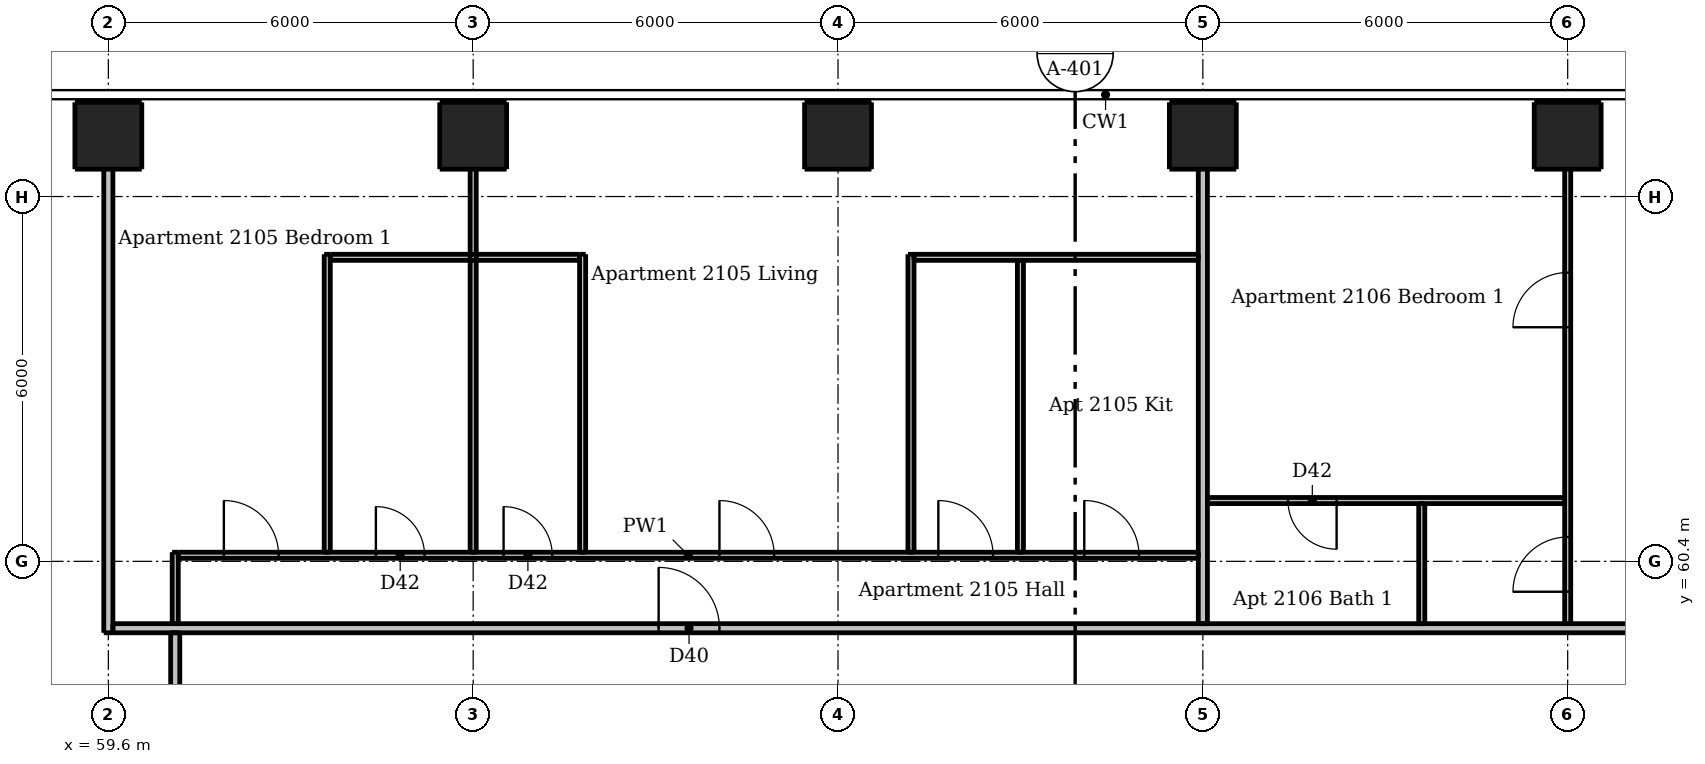
"""IFC4 building model, lengths in metres.
Left out: names, types, materials, properties, quantities, classifications, styles, units other than length and angle.
Written with IfcOpenShell. Run it as: python <this file> out.ifc"""

import sys

from ifc_helpers import new_model, si_unit, direction, frame, frame_2d, origin, origin_2d, place, context, subcontext, project, spatial, rectangle, extrude, element, fill, save


model = new_model("IFC4")
c1 = context("Model", 3, precision=1e-05, world=origin(), true_north=direction((0.0, 1.0)))
c2 = subcontext(c1, "Body", "Model", "MODEL_VIEW")
j1 = project(units=[si_unit("LENGTHUNIT", "METRE"), si_unit("PLANEANGLEUNIT", "RADIAN")], contexts=[c1])
p1 = place(None, origin())
s1 = spatial("IfcSite", under=j1, at=p1, CompositionType="ELEMENT")
p2 = place(p1, origin())
s2 = spatial("IfcBuilding", under=s1, at=p2, CompositionType="ELEMENT")
p3 = place(p2, frame((0.0, 0.0, 82.0)))
s3 = spatial("IfcBuildingStorey", under=s2, at=p3, CompositionType="ELEMENT", Elevation=82.0)
for number, where, z_axis, x_axis in (
    (1, (59.6, 67.4, 0.0), (0.0, 0.0, 1.0), (1.0, 0.0, 0.0)),
    (2, (65.6, 67.4, 0.0), (0.0, 0.0, 1.0), (1.0, 0.0, 0.0)),
    (3, (71.6, 67.4, 0.0), (0.0, 0.0, 1.0), (1.0, 0.0, 0.0)),
    (4, (77.6, 67.4, 0.0), (0.0, 0.0, 1.0), (1.0, 0.0, 0.0)),
    (5, (83.6, 67.4, 0.0), (0.0, 0.0, 1.0), (1.0, 0.0, 0.0)),
):
    element("IfcColumn", number, at=place(p3, frame(where, z_axis=z_axis, x_axis=x_axis)), inside=s3, PredefinedType="COLUMN", context=c2, shape_type="SweptSolid", body=[
        extrude(rectangle(XDim=1.1, YDim=1.1, at=origin_2d()), origin(), (0.0, 0.0, 1.0), 3.05),
    ])
p4 = place(p3, frame((60.7, 59.375, 0.0), z_axis=(0.0, 0.0, 1.0), x_axis=(0.0, 1.0, 0.0)))
e6 = element("IfcWall", 6, at=p4, inside=s3, PredefinedType="PARTITIONING", context=c2, shape_type="SweptSolid", body=[
    extrude(rectangle(XDim=1.175, YDim=0.1, at=frame_2d((0.587, 0.0))), origin(), (0.0, 0.0, 1.0), 3.05),
])
p5 = place(p3, frame((63.2, 60.55, 0.0), z_axis=(0.0, 0.0, 1.0), x_axis=(0.0, 1.0, 0.0)))
e7 = element("IfcWall", 7, at=p5, inside=s3, PredefinedType="PARTITIONING", context=c2, shape_type="SweptSolid", body=[
    extrude(rectangle(XDim=4.9, YDim=0.1, at=frame_2d((2.45, 0.0))), origin(), (0.0, 0.0, 1.0), 3.05),
])
p6 = place(p3, frame((65.6, 60.55, 0.0), z_axis=(0.0, 0.0, 1.0), x_axis=(0.0, 1.0, 0.0)))
e8 = element("IfcWall", 8, at=p6, inside=s3, PredefinedType="PARTITIONING", context=c2, shape_type="SweptSolid", body=[
    extrude(rectangle(XDim=7.45, YDim=0.1, at=frame_2d((3.725, 0.0))), origin(), (0.0, 0.0, 1.0), 2.516),
])
for number, where, z_axis, x_axis in (
    (9, (67.4, 60.55, 0.0), (0.0, 0.0, 1.0), (0.0, 1.0, 0.0)),
    (10, (72.8, 60.55, 0.0), (0.0, 0.0, 1.0), (0.0, 1.0, 0.0)),
):
    element("IfcWall", number, at=place(p3, frame(where, z_axis=z_axis, x_axis=x_axis)), inside=s3, PredefinedType="PARTITIONING", context=c2, shape_type="SweptSolid", body=[
        extrude(rectangle(XDim=4.9, YDim=0.1, at=frame_2d((2.45, 0.0))), origin(), (0.0, 0.0, 1.0), 3.05),
    ])
p7 = place(p3, frame((74.6, 60.55, 0.0), z_axis=(0.0, 0.0, 1.0), x_axis=(0.0, 1.0, 0.0)))
e11 = element("IfcWall", 11, at=p7, inside=s3, PredefinedType="PARTITIONING", context=c2, shape_type="SweptSolid", body=[
    extrude(rectangle(XDim=4.8, YDim=0.1, at=frame_2d((2.4, 0.0))), origin(), (0.0, 0.0, 1.0), 3.05),
])
p8 = place(p3, frame((81.2, 59.375, 0.0), z_axis=(0.0, 0.0, 1.0), x_axis=(0.0, 1.0, 0.0)))
e12 = element("IfcWall", 12, at=p8, inside=s3, PredefinedType="PARTITIONING", context=c2, shape_type="SweptSolid", body=[
    extrude(rectangle(XDim=1.975, YDim=0.1, at=frame_2d((0.988, 0.0))), origin(), (0.0, 0.0, 1.0), 3.05),
])
p9 = place(p3, frame((83.6, 59.375, 0.0), z_axis=(0.0, 0.0, 1.0), x_axis=(0.0, 1.0, 0.0)))
e13 = element("IfcWall", 13, at=p9, inside=s3, PredefinedType="PARTITIONING", context=c2, shape_type="SweptSolid", body=[
    extrude(rectangle(XDim=8.625, YDim=0.1, at=frame_2d((4.312, 0.0))), origin(), (0.0, 0.0, 1.0), 2.516),
])
p10 = place(p9, frame((0.525, 0.0, 0.0)))
e14 = element("IfcOpeningElement", 14, at=p10, cuts=e13, PredefinedType="OPENING", context=c2, shape_type="SweptSolid", body=[
    extrude(rectangle(XDim=0.9, YDim=2.1, at=frame_2d((0.45, 1.05))), frame((0.0, 0.06, 0.0), z_axis=(0.0, -1.0, 0.0), x_axis=(1.0, 0.0, 0.0)), (0.0, 0.0, 1.0), 0.12),
])
p11 = place(p9, frame((4.875, 0.0, 0.0)))
e15 = element("IfcOpeningElement", 15, at=p11, cuts=e13, PredefinedType="OPENING", context=c2, shape_type="SweptSolid", body=[
    extrude(rectangle(XDim=0.9, YDim=2.1, at=frame_2d((0.45, 1.05))), frame((0.0, 0.06, 0.0), z_axis=(0.0, -1.0, 0.0), x_axis=(1.0, 0.0, 0.0)), (0.0, 0.0, 1.0), 0.12),
])
p12 = place(p3, frame((63.25, 65.4, 0.0), z_axis=(0.0, 0.0, 1.0), x_axis=(1.0, 0.0, 0.0)))
e16 = element("IfcWall", 16, at=p12, inside=s3, PredefinedType="PARTITIONING", context=c2, shape_type="SweptSolid", body=[
    extrude(rectangle(XDim=4.1, YDim=0.1, at=frame_2d((2.05, 0.0))), origin(), (0.0, 0.0, 1.0), 3.05),
])
p13 = place(p3, frame((72.85, 65.4, 0.0), z_axis=(0.0, 0.0, 1.0), x_axis=(1.0, 0.0, 0.0)))
e17 = element("IfcWall", 17, at=p13, inside=s3, PredefinedType="PARTITIONING", context=c2, shape_type="SweptSolid", body=[
    extrude(rectangle(XDim=4.675, YDim=0.1, at=frame_2d((2.337, 0.0))), origin(), (0.0, 0.0, 1.0), 3.05),
])
p14 = place(p3, frame((83.55, 61.4, 0.0), z_axis=(0.0, 0.0, 1.0), x_axis=(-1.0, 0.0, 0.0)))
e18 = element("IfcWall", 18, at=p14, inside=s3, PredefinedType="PARTITIONING", context=c2, shape_type="SweptSolid", body=[
    extrude(rectangle(XDim=5.875, YDim=0.1, at=frame_2d((2.938, 0.0))), origin(), (0.0, 0.0, 1.0), 3.05),
])
p15 = place(p14, frame((3.75, 0.0, 0.0)))
e19 = element("IfcOpeningElement", 19, at=p15, cuts=e18, PredefinedType="OPENING", context=c2, shape_type="SweptSolid", body=[
    extrude(rectangle(XDim=0.8, YDim=2.1, at=frame_2d((0.4, 1.05))), frame((0.0, 0.06, 0.0), z_axis=(0.0, -1.0, 0.0), x_axis=(1.0, 0.0, 0.0)), (0.0, 0.0, 1.0), 0.12),
])
p16 = place(p3, frame((60.75, 60.5, 0.0), z_axis=(0.0, 0.0, 1.0), x_axis=(1.0, 0.0, 0.0)))
e20 = element("IfcWall", 20, at=p16, inside=s3, PredefinedType="PARTITIONING", context=c2, shape_type="SweptSolid", body=[
    extrude(rectangle(XDim=16.775, YDim=0.1, at=frame_2d((8.387, 0.0))), origin(), (0.0, 0.0, 1.0), 3.05),
])
p17 = place(p16, frame((8.9, 0.0, 0.0)))
e21 = element("IfcOpeningElement", 21, at=p17, cuts=e20, PredefinedType="OPENING", context=c2, shape_type="SweptSolid", body=[
    extrude(rectangle(XDim=0.9, YDim=2.1, at=frame_2d((0.45, 1.05))), frame((0.0, 0.06, 0.0), z_axis=(0.0, -1.0, 0.0), x_axis=(1.0, 0.0, 0.0)), (0.0, 0.0, 1.0), 0.12),
])
p18 = place(p16, frame((14.9, 0.0, 0.0)))
e22 = element("IfcOpeningElement", 22, at=p18, cuts=e20, PredefinedType="OPENING", context=c2, shape_type="SweptSolid", body=[
    extrude(rectangle(XDim=0.9, YDim=2.1, at=frame_2d((0.45, 1.05))), frame((0.0, 0.06, 0.0), z_axis=(0.0, -1.0, 0.0), x_axis=(1.0, 0.0, 0.0)), (0.0, 0.0, 1.0), 0.12),
])
p19 = place(p16, frame((12.5, 0.0, 0.0)))
e23 = element("IfcOpeningElement", 23, at=p19, cuts=e20, PredefinedType="OPENING", context=c2, shape_type="SweptSolid", body=[
    extrude(rectangle(XDim=0.9, YDim=2.1, at=frame_2d((0.45, 1.05))), frame((0.0, 0.06, 0.0), z_axis=(0.0, -1.0, 0.0), x_axis=(1.0, 0.0, 0.0)), (0.0, 0.0, 1.0), 0.12),
])
p20 = place(p16, frame((5.35, 0.0, 0.0)))
e24 = element("IfcOpeningElement", 24, at=p20, cuts=e20, PredefinedType="OPENING", context=c2, shape_type="SweptSolid", body=[
    extrude(rectangle(XDim=0.8, YDim=2.1, at=frame_2d((0.4, 1.05))), frame((0.0, 0.06, 0.0), z_axis=(0.0, -1.0, 0.0), x_axis=(1.0, 0.0, 0.0)), (0.0, 0.0, 1.0), 0.12),
])
p21 = place(p16, frame((0.75, 0.0, 0.0)))
e25 = element("IfcOpeningElement", 25, at=p21, cuts=e20, PredefinedType="OPENING", context=c2, shape_type="SweptSolid", body=[
    extrude(rectangle(XDim=0.9, YDim=2.1, at=frame_2d((0.45, 1.05))), frame((0.0, 0.06, 0.0), z_axis=(0.0, -1.0, 0.0), x_axis=(1.0, 0.0, 0.0)), (0.0, 0.0, 1.0), 0.12),
])
p22 = place(p16, frame((3.25, 0.0, 0.0)))
e26 = element("IfcOpeningElement", 26, at=p22, cuts=e20, PredefinedType="OPENING", context=c2, shape_type="SweptSolid", body=[
    extrude(rectangle(XDim=0.8, YDim=2.1, at=frame_2d((0.4, 1.05))), frame((0.0, 0.06, 0.0), z_axis=(0.0, -1.0, 0.0), x_axis=(1.0, 0.0, 0.0)), (0.0, 0.0, 1.0), 0.12),
])
p23 = place(p3, frame((59.6, 59.225, 0.0), z_axis=(0.0, 0.0, 1.0), x_axis=(0.0, 1.0, 0.0)))
e27 = element("IfcWall", 27, at=p23, inside=s3, PredefinedType="PARTITIONING", context=c2, shape_type="SweptSolid", body=[
    extrude(rectangle(XDim=8.775, YDim=0.15, at=frame_2d((4.387, 0.0))), origin(), (0.0, 0.0, 1.0), 2.51),
])
p24 = place(p3, frame((60.7, 30.325, 0.0), z_axis=(0.0, 0.0, 1.0), x_axis=(0.0, 1.0, 0.0)))
e28 = element("IfcWall", 28, at=p24, inside=s3, PredefinedType="PARTITIONING", context=c2, shape_type="SweptSolid", body=[
    extrude(rectangle(XDim=28.9, YDim=0.15, at=frame_2d((14.45, 0.0))), origin(), (0.0, 0.0, 1.0), 3.05),
])
p25 = place(p24, frame((9.225, 0.0, 0.0)))
e29 = element("IfcOpeningElement", 29, at=p25, cuts=e28, PredefinedType="OPENING", context=c2, shape_type="SweptSolid", body=[
    extrude(rectangle(XDim=1.0, YDim=2.1, at=frame_2d((0.5, 1.05))), frame((0.0, 0.085, 0.0), z_axis=(0.0, -1.0, 0.0), x_axis=(1.0, 0.0, 0.0)), (0.0, 0.0, 1.0), 0.17),
])
p26 = place(p24, frame((26.025, 0.0, 0.0)))
e30 = element("IfcOpeningElement", 30, at=p26, cuts=e28, PredefinedType="OPENING", context=c2, shape_type="SweptSolid", body=[
    extrude(rectangle(XDim=1.0, YDim=2.1, at=frame_2d((0.5, 1.05))), frame((0.0, 0.085, 0.0), z_axis=(0.0, -1.0, 0.0), x_axis=(1.0, 0.0, 0.0)), (0.0, 0.0, 1.0), 0.17),
])
p27 = place(p3, frame((77.6, 59.375, 0.0), z_axis=(0.0, 0.0, 1.0), x_axis=(0.0, 1.0, 0.0)))
e31 = element("IfcWall", 31, at=p27, inside=s3, PredefinedType="PARTITIONING", context=c2, shape_type="SweptSolid", body=[
    extrude(rectangle(XDim=8.625, YDim=0.15, at=frame_2d((4.312, 0.0))), origin(), (0.0, 0.0, 1.0), 2.516),
])
p28 = place(p3, frame((59.675, 59.3, 0.0), z_axis=(0.0, 0.0, 1.0), x_axis=(1.0, 0.0, 0.0)))
e32 = element("IfcWall", 32, at=p28, inside=s3, PredefinedType="PARTITIONING", context=c2, shape_type="SweptSolid", body=[
    extrude(rectangle(XDim=28.55, YDim=0.15, at=frame_2d((14.275, 0.0))), origin(), (0.0, 0.0, 1.0), 3.05),
])
p29 = place(p28, frame((8.975, 0.0, 0.0)))
e33 = element("IfcOpeningElement", 33, at=p29, cuts=e32, PredefinedType="OPENING", context=c2, shape_type="SweptSolid", body=[
    extrude(rectangle(XDim=1.0, YDim=2.1, at=frame_2d((0.5, 1.05))), frame((0.0, 0.085, 0.0), z_axis=(0.0, -1.0, 0.0), x_axis=(1.0, 0.0, 0.0)), (0.0, 0.0, 1.0), 0.17),
])
p30 = place(p28, frame((25.775, 0.0, 0.0)))
e34 = element("IfcOpeningElement", 34, at=p30, cuts=e32, PredefinedType="OPENING", context=c2, shape_type="SweptSolid", body=[
    extrude(rectangle(XDim=1.0, YDim=2.1, at=frame_2d((0.5, 1.05))), frame((0.0, 0.085, 0.0), z_axis=(0.0, -1.0, 0.0), x_axis=(1.0, 0.0, 0.0)), (0.0, 0.0, 1.0), 0.17),
])
p31 = place(p29, origin())
e35 = element("IfcDoor", 35, at=p31, inside=s3, OperationType="SINGLE_SWING_LEFT", PredefinedType="DOOR", context=c2, shape_type="SweptSolid", body=[
    extrude(rectangle(XDim=1.0, YDim=2.1, at=frame_2d((0.5, 1.05))), frame((0.0, 0.025, 0.0), z_axis=(0.0, -1.0, 0.0), x_axis=(1.0, 0.0, 0.0)), (0.0, 0.0, 1.0), 0.05),
])
fill(e33, e35)
p32 = place(p17, origin())
e36 = element("IfcDoor", 36, at=p32, inside=s3, OperationType="SINGLE_SWING_LEFT", PredefinedType="DOOR", context=c2, shape_type="SweptSolid", body=[
    extrude(rectangle(XDim=0.9, YDim=2.1, at=frame_2d((0.45, 1.05))), frame((0.0, 0.025, 0.0), z_axis=(0.0, -1.0, 0.0), x_axis=(1.0, 0.0, 0.0)), (0.0, 0.0, 1.0), 0.05),
])
fill(e21, e36)
p33 = place(p18, origin())
e37 = element("IfcDoor", 37, at=p33, inside=s3, OperationType="SINGLE_SWING_LEFT", PredefinedType="DOOR", context=c2, shape_type="SweptSolid", body=[
    extrude(rectangle(XDim=0.9, YDim=2.1, at=frame_2d((0.45, 1.05))), frame((0.0, 0.025, 0.0), z_axis=(0.0, -1.0, 0.0), x_axis=(1.0, 0.0, 0.0)), (0.0, 0.0, 1.0), 0.05),
])
fill(e22, e37)
p34 = place(p19, origin())
e38 = element("IfcDoor", 38, at=p34, inside=s3, OperationType="SINGLE_SWING_LEFT", PredefinedType="DOOR", context=c2, shape_type="SweptSolid", body=[
    extrude(rectangle(XDim=0.9, YDim=2.1, at=frame_2d((0.45, 1.05))), frame((0.0, 0.025, 0.0), z_axis=(0.0, -1.0, 0.0), x_axis=(1.0, 0.0, 0.0)), (0.0, 0.0, 1.0), 0.05),
])
fill(e23, e38)
p35 = place(p20, origin())
e39 = element("IfcDoor", 39, at=p35, inside=s3, OperationType="SINGLE_SWING_LEFT", PredefinedType="DOOR", context=c2, shape_type="SweptSolid", body=[
    extrude(rectangle(XDim=0.8, YDim=2.1, at=frame_2d((0.4, 1.05))), frame((0.0, 0.025, 0.0), z_axis=(0.0, -1.0, 0.0), x_axis=(1.0, 0.0, 0.0)), (0.0, 0.0, 1.0), 0.05),
])
fill(e24, e39)
p36 = place(p21, origin())
e40 = element("IfcDoor", 40, at=p36, inside=s3, OperationType="SINGLE_SWING_LEFT", PredefinedType="DOOR", context=c2, shape_type="SweptSolid", body=[
    extrude(rectangle(XDim=0.9, YDim=2.1, at=frame_2d((0.45, 1.05))), frame((0.0, 0.025, 0.0), z_axis=(0.0, -1.0, 0.0), x_axis=(1.0, 0.0, 0.0)), (0.0, 0.0, 1.0), 0.05),
])
fill(e25, e40)
p37 = place(p22, origin())
e41 = element("IfcDoor", 41, at=p37, inside=s3, OperationType="SINGLE_SWING_LEFT", PredefinedType="DOOR", context=c2, shape_type="SweptSolid", body=[
    extrude(rectangle(XDim=0.8, YDim=2.1, at=frame_2d((0.4, 1.05))), frame((0.0, 0.025, 0.0), z_axis=(0.0, -1.0, 0.0), x_axis=(1.0, 0.0, 0.0)), (0.0, 0.0, 1.0), 0.05),
])
fill(e26, e41)
p38 = place(p10, origin())
e42 = element("IfcDoor", 42, at=p38, inside=s3, OperationType="SINGLE_SWING_LEFT", PredefinedType="DOOR", context=c2, shape_type="SweptSolid", body=[
    extrude(rectangle(XDim=0.9, YDim=2.1, at=frame_2d((0.45, 1.05))), frame((0.0, 0.025, 0.0), z_axis=(0.0, -1.0, 0.0), x_axis=(1.0, 0.0, 0.0)), (0.0, 0.0, 1.0), 0.05),
])
fill(e14, e42)
p39 = place(p11, origin())
e43 = element("IfcDoor", 43, at=p39, inside=s3, OperationType="SINGLE_SWING_LEFT", PredefinedType="DOOR", context=c2, shape_type="SweptSolid", body=[
    extrude(rectangle(XDim=0.9, YDim=2.1, at=frame_2d((0.45, 1.05))), frame((0.0, 0.025, 0.0), z_axis=(0.0, -1.0, 0.0), x_axis=(1.0, 0.0, 0.0)), (0.0, 0.0, 1.0), 0.05),
])
fill(e15, e43)
p40 = place(p15, origin())
e44 = element("IfcDoor", 44, at=p40, inside=s3, OperationType="SINGLE_SWING_LEFT", PredefinedType="DOOR", context=c2, shape_type="SweptSolid", body=[
    extrude(rectangle(XDim=0.8, YDim=2.1, at=frame_2d((0.4, 1.05))), frame((0.0, 0.025, 0.0), z_axis=(0.0, -1.0, 0.0), x_axis=(1.0, 0.0, 0.0)), (0.0, 0.0, 1.0), 0.05),
])
fill(e19, e44)
save(model, sys.argv[1])
